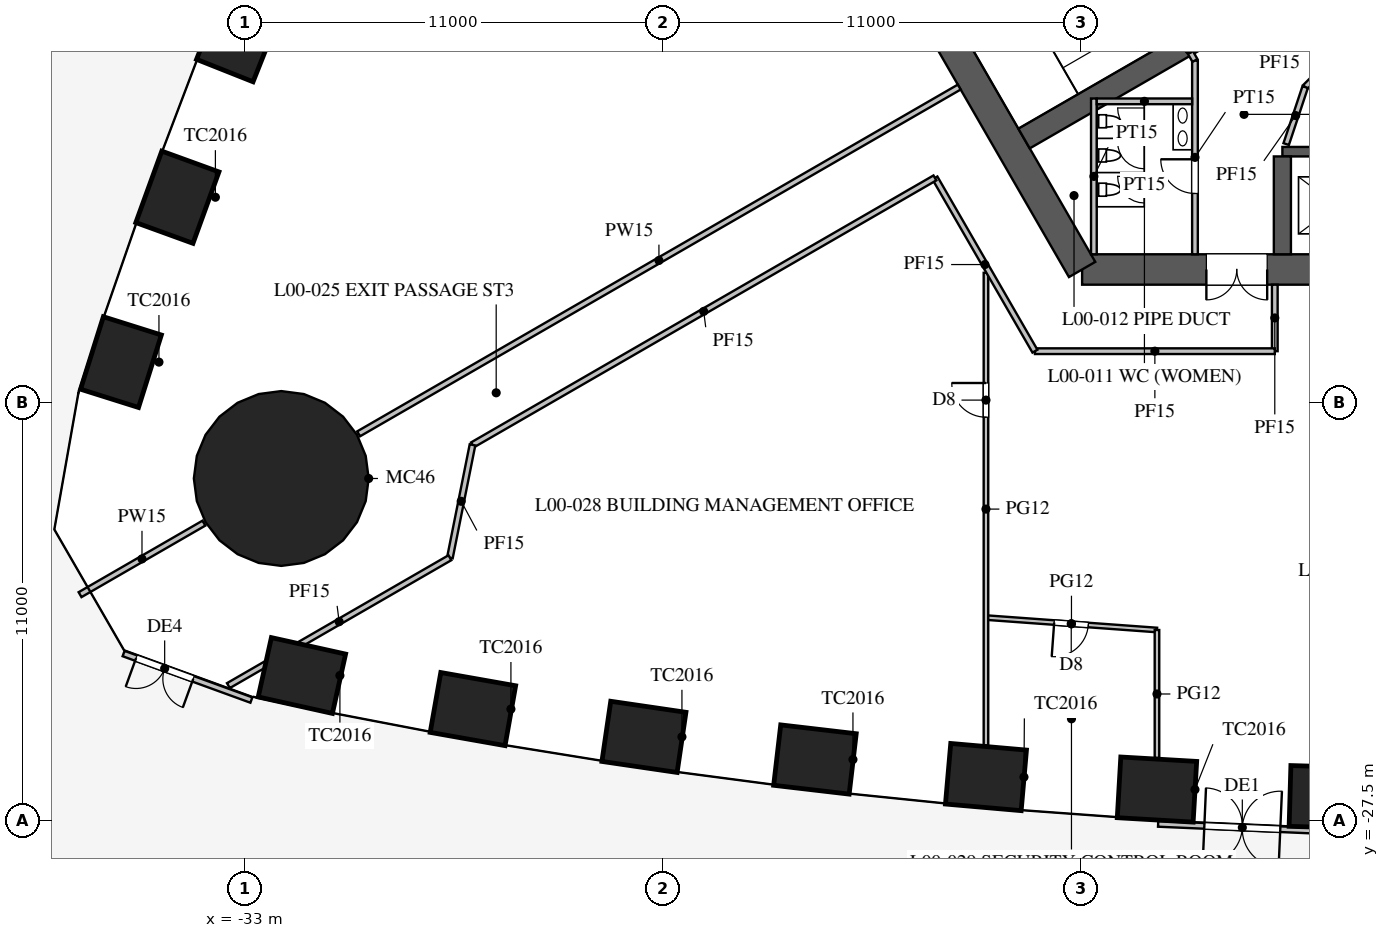
"""IFC4 building model, lengths in metres.
Left out: names, types, materials, properties, quantities, classifications, styles, units other than length and angle.
Written with IfcOpenShell. Run it as: python <this file> out.ifc"""

import sys

from ifc_helpers import new_model, si_unit, direction, frame, frame_2d, origin, origin_2d, place, context, subcontext, project, spatial, rectangle, circle, extrude, element, fill, save


model = new_model("IFC4")
c1 = context("Model", 3, precision=1e-05, world=origin(), true_north=direction((0.0, 1.0)))
c2 = subcontext(c1, "Body", "Model", "MODEL_VIEW")
j1 = project(units=[si_unit("LENGTHUNIT", "METRE"), si_unit("PLANEANGLEUNIT", "RADIAN")], contexts=[c1])
p1 = place(None, origin())
s1 = spatial("IfcSite", under=j1, at=p1, CompositionType="ELEMENT")
p2 = place(p1, origin())
s2 = spatial("IfcBuilding", under=s1, at=p2, CompositionType="ELEMENT")
p3 = place(p2, origin())
s3 = spatial("IfcBuildingStorey", under=s2, at=p3, CompositionType="ELEMENT", Elevation=0.0)
for number, where, z_axis, x_axis in (
    (1, (-31.5, -23.685, 0.0), (0.0, 0.0, 1.0), (0.976, -0.217, 0.0)),
    (2, (-27.0, -24.568, 0.0), (0.0, 0.0, 1.0), (0.985, -0.174, 0.0)),
    (3, (-22.5, -25.299, 0.0), (0.0, 0.0, 1.0), (0.989, -0.145, 0.0)),
    (4, (-18.0, -25.895, 0.0), (0.0, 0.0, 1.0), (0.993, -0.116, 0.0)),
    (5, (-13.5, -26.357, 0.0), (0.0, 0.0, 1.0), (0.996, -0.087, 0.0)),
    (6, (-9.0, -26.686, 0.0), (0.0, 0.0, 1.0), (0.998, -0.058, 0.0)),
    (7, (-4.5, -26.883, 0.0), (0.0, 0.0, 1.0), (1.0, -0.029, 0.0)),
    (8, (-33.16, -6.836, 0.0), (0.0, 0.0, 1.0), (-0.369, -0.929, 0.0)),
    (9, (-34.776, -11.099, 0.0), (0.0, 0.0, 1.0), (-0.342, -0.94, 0.0)),
    (10, (-36.262, -15.438, 0.0), (0.0, 0.0, 1.0), (-0.3, -0.954, 0.0)),
):
    element("IfcColumn", number, at=place(p3, frame(where, z_axis=z_axis, x_axis=x_axis)), inside=s3, PredefinedType="COLUMN", context=c2, shape_type="SweptSolid", body=[
        extrude(rectangle(XDim=2.0, YDim=1.6, at=origin_2d()), origin(), (0.0, 0.0, 1.0), 6.5),
    ])
p4 = place(p3, frame((-32.043, -18.5, 0.0), z_axis=(0.0, 0.0, 1.0), x_axis=(1.0, 0.0, 0.0)))
e11 = element("IfcColumn", 11, at=p4, inside=s3, PredefinedType="COLUMN", context=c2, shape_type="SweptSolid", body=[
    extrude(circle(Radius=2.3, at=origin_2d()), origin(), (0.0, 0.0, 1.0), 6.5),
])
p5 = place(p3, frame((-10.97, -13.0, 0.0), z_axis=(0.0, 0.0, 1.0), x_axis=(1.0, 0.0, 0.0)))
e12 = element("IfcWall", 12, at=p5, inside=s3, PredefinedType="SHEAR", context=c2, shape_type="SweptSolid", body=[
    extrude(rectangle(XDim=21.939, YDim=0.8, at=frame_2d((10.97, 0.0))), origin(), (0.0, 0.0, 1.0), 6.5),
])
p6 = place(p5, frame((16.97, 0.0, 0.0)))
e13 = element("IfcOpeningElement", 13, at=p6, cuts=e12, PredefinedType="OPENING", context=c2, shape_type="SweptSolid", body=[
    extrude(rectangle(XDim=1.8, YDim=2.1, at=frame_2d((0.9, 1.05))), frame((0.0, 0.41, 0.0), z_axis=(0.0, -1.0, 0.0), x_axis=(1.0, 0.0, 0.0)), (0.0, 0.0, 1.0), 0.82),
])
p7 = place(p5, frame((3.27, 0.0, 0.0)))
e14 = element("IfcOpeningElement", 14, at=p7, cuts=e12, PredefinedType="OPENING", context=c2, shape_type="SweptSolid", body=[
    extrude(rectangle(XDim=1.6, YDim=2.1, at=frame_2d((0.8, 1.05))), frame((0.0, 0.41, 0.0), z_axis=(0.0, -1.0, 0.0), x_axis=(1.0, 0.0, 0.0)), (0.0, 0.0, 1.0), 0.82),
])
p8 = place(p3, frame((-16.743, -3.0, 0.0), z_axis=(0.0, 0.0, 1.0), x_axis=(0.499995765644, -0.866027848477, 0.0)))
e15 = element("IfcWall", 15, at=p8, inside=s3, PredefinedType="SHEAR", context=c2, shape_type="SweptSolid", body=[
    extrude(rectangle(XDim=11.547, YDim=0.8, at=frame_2d((5.773, 0.0))), origin(), (0.0, 0.0, 1.0), 6.5),
])
p9 = place(p3, frame((-5.7, -9.9, 0.0), z_axis=(0.0, 0.0, 1.0), x_axis=(1.0, 0.0, 0.0)))
e16 = element("IfcWall", 16, at=p9, inside=s3, PredefinedType="SHEAR", context=c2, shape_type="SweptSolid", body=[
    extrude(rectangle(XDim=11.4, YDim=0.25, at=frame_2d((5.7, 0.0))), origin(), (0.0, 0.0, 1.0), 6.5),
])
p10 = place(p9, frame((0.875, 0.0, 0.0)))
e17 = element("IfcOpeningElement", 17, at=p10, cuts=e16, PredefinedType="OPENING", context=c2, shape_type="SweptSolid", body=[
    extrude(rectangle(XDim=1.1, YDim=2.2, at=frame_2d((0.55, 1.1))), frame((0.0, 0.135, 0.0), z_axis=(0.0, -1.0, 0.0), x_axis=(1.0, 0.0, 0.0)), (0.0, 0.0, 1.0), 0.27),
])
p11 = place(p9, frame((3.725, 0.0, 0.0)))
e18 = element("IfcOpeningElement", 18, at=p11, cuts=e16, PredefinedType="OPENING", context=c2, shape_type="SweptSolid", body=[
    extrude(rectangle(XDim=1.1, YDim=2.2, at=frame_2d((0.55, 1.1))), frame((0.0, 0.135, 0.0), z_axis=(0.0, -1.0, 0.0), x_axis=(1.0, 0.0, 0.0)), (0.0, 0.0, 1.0), 0.27),
])
p12 = place(p9, frame((6.575, 0.0, 0.0)))
e19 = element("IfcOpeningElement", 19, at=p12, cuts=e16, PredefinedType="OPENING", context=c2, shape_type="SweptSolid", body=[
    extrude(rectangle(XDim=1.1, YDim=2.2, at=frame_2d((0.55, 1.1))), frame((0.0, 0.135, 0.0), z_axis=(0.0, -1.0, 0.0), x_axis=(1.0, 0.0, 0.0)), (0.0, 0.0, 1.0), 0.27),
])
p13 = place(p9, frame((9.425, 0.0, 0.0)))
e20 = element("IfcOpeningElement", 20, at=p13, cuts=e16, PredefinedType="OPENING", context=c2, shape_type="SweptSolid", body=[
    extrude(rectangle(XDim=1.1, YDim=2.2, at=frame_2d((0.55, 1.1))), frame((0.0, 0.135, 0.0), z_axis=(0.0, -1.0, 0.0), x_axis=(1.0, 0.0, 0.0)), (0.0, 0.0, 1.0), 0.27),
])
p14 = place(p3, frame((-5.7, -10.025, 0.0), z_axis=(0.0, 0.0, 1.0), x_axis=(0.0, -1.0, 0.0)))
e21 = element("IfcWall", 21, at=p14, inside=s3, PredefinedType="SHEAR", context=c2, shape_type="SweptSolid", body=[
    extrude(rectangle(XDim=2.575, YDim=0.45, at=frame_2d((1.288, 0.0))), origin(), (0.0, 0.0, 1.0), 6.5),
])
p15 = place(p3, frame((-4.638, -5.016, 0.0), z_axis=(0.0, 0.0, 1.0), x_axis=(-0.866019375473, -0.500010441196, 0.0)))
e22 = element("IfcWall", 22, at=p15, inside=s3, PredefinedType="SHEAR", context=c2, shape_type="SweptSolid", body=[
    extrude(rectangle(XDim=9.075, YDim=0.6, at=frame_2d((4.538, 0.0))), origin(), (0.0, 0.0, 1.0), 6.5),
])
p16 = place(p15, frame((0.265, 0.0, 0.0)))
e23 = element("IfcOpeningElement", 23, at=p16, cuts=e22, PredefinedType="OPENING", context=c2, shape_type="SweptSolid", body=[
    extrude(rectangle(XDim=1.6, YDim=2.1, at=frame_2d((0.8, 1.05))), frame((0.0, 0.31, 0.0), z_axis=(0.0, -1.0, 0.0), x_axis=(1.0, 0.0, 0.0)), (0.0, 0.0, 1.0), 0.62),
])
p17 = place(p3, frame((-8.969, -27.589, 0.0), z_axis=(0.0, 0.0, 1.0), x_axis=(0.999053663589, -0.043494565978, 0.0)))
e24 = element("IfcWall", 24, at=p17, inside=s3, PredefinedType="SOLIDWALL", context=c2, shape_type="SweptSolid", body=[
    extrude(rectangle(XDim=4.434, YDim=0.15, at=frame_2d((2.217, 0.0))), origin(), (0.0, 0.0, 1.0), 6.48),
])
p18 = place(p17, frame((1.217, 0.0, 0.0)))
e25 = element("IfcOpeningElement", 25, at=p18, cuts=e24, PredefinedType="OPENING", context=c2, shape_type="SweptSolid", body=[
    extrude(rectangle(XDim=2.0, YDim=3.0, at=frame_2d((1.0, 1.5))), frame((0.0, 0.085, 0.0), z_axis=(0.0, -1.0, 0.0), x_axis=(1.0, 0.0, 0.0)), (0.0, 0.0, 1.0), 0.17),
])
p19 = place(p3, frame((-36.192, -23.107, 0.0), z_axis=(0.0, 0.0, 1.0), x_axis=(0.939683806401, -0.342044359678, 0.0)))
e26 = element("IfcWall", 26, at=p19, inside=s3, PredefinedType="SOLIDWALL", context=c2, shape_type="SweptSolid", body=[
    extrude(rectangle(XDim=3.578, YDim=0.15, at=frame_2d((1.789, 0.0))), origin(), (0.0, 0.0, 1.0), 6.48),
])
p20 = place(p19, frame((0.35, 0.0, 0.0)))
e27 = element("IfcOpeningElement", 27, at=p20, cuts=e26, PredefinedType="OPENING", context=c2, shape_type="SweptSolid", body=[
    extrude(rectangle(XDim=1.6, YDim=2.4, at=frame_2d((0.8, 1.2))), frame((0.0, 0.085, 0.0), z_axis=(0.0, -1.0, 0.0), x_axis=(1.0, 0.0, 0.0)), (0.0, 0.0, 1.0), 0.17),
])
p21 = place(p3, frame((-8.0, -7.5, 0.0), z_axis=(0.0, 0.0, 1.0), x_axis=(0.0, -1.0, 0.0)))
e28 = element("IfcWall", 28, at=p21, inside=s3, PredefinedType="PARTITIONING", context=c2, shape_type="SweptSolid", body=[
    extrude(rectangle(XDim=5.1, YDim=0.15, at=frame_2d((2.55, 0.0))), origin(), (0.0, 0.0, 1.0), 6.3),
])
p22 = place(p21, frame((2.6, 0.0, 0.0)))
e29 = element("IfcOpeningElement", 29, at=p22, cuts=e28, PredefinedType="OPENING", context=c2, shape_type="SweptSolid", body=[
    extrude(rectangle(XDim=0.9, YDim=2.1, at=frame_2d((0.45, 1.05))), frame((0.0, 0.085, 0.0), z_axis=(0.0, -1.0, 0.0), x_axis=(1.0, 0.0, 0.0)), (0.0, 0.0, 1.0), 0.17),
])
p23 = place(p3, frame((-8.0, -7.5, 0.0), z_axis=(0.0, 0.0, 1.0), x_axis=(-0.499842556608, 0.866116284689, 0.0)))
e30 = element("IfcWall", 30, at=p23, inside=s3, PredefinedType="PARTITIONING", context=c2, shape_type="SweptSolid", body=[
    extrude(rectangle(XDim=0.645, YDim=0.15, at=frame_2d((0.323, 0.0))), origin(), (0.0, 0.0, 1.0), 6.3),
])
p24 = place(p3, frame((-10.66, -8.5, 0.0), z_axis=(0.0, 0.0, 1.0), x_axis=(0.0, -1.0, 0.0)))
e31 = element("IfcWall", 31, at=p24, inside=s3, PredefinedType="PARTITIONING", context=c2, shape_type="SweptSolid", body=[
    extrude(rectangle(XDim=4.1, YDim=0.15, at=frame_2d((2.05, 0.0))), origin(), (0.0, 0.0, 1.0), 6.3),
])
p25 = place(p3, frame((-8.075, -8.575, 0.0), z_axis=(0.0, 0.0, 1.0), x_axis=(-1.0, 0.0, 0.0)))
e32 = element("IfcWall", 32, at=p25, inside=s3, PredefinedType="PARTITIONING", context=c2, shape_type="SweptSolid", body=[
    extrude(rectangle(XDim=2.51, YDim=0.15, at=frame_2d((1.255, 0.0))), origin(), (0.0, 0.0, 1.0), 6.3),
])
p26 = place(p3, frame((-14.203, -8.2, 0.0), z_axis=(0.0, 0.0, 1.0), x_axis=(-0.866024965723, -0.500000758745, 0.0)))
e33 = element("IfcWall", 33, at=p26, inside=s3, PredefinedType="PARTITIONING", context=c2, shape_type="SweptSolid", body=[
    extrude(rectangle(XDim=18.25, YDim=0.15, at=frame_2d((9.125, 0.0))), origin(), (0.0, 0.0, 1.0), 4.6),
])
p27 = place(p3, frame((-34.078, -19.675, 0.0), z_axis=(0.0, 0.0, 1.0), x_axis=(-0.866019247219, -0.500010663332, 0.0)))
e34 = element("IfcWall", 34, at=p27, inside=s3, PredefinedType="PARTITIONING", context=c2, shape_type="SweptSolid", body=[
    extrude(rectangle(XDim=3.764, YDim=0.15, at=frame_2d((1.882, 0.0))), origin(), (0.0, 0.0, 1.0), 4.6),
])
p28 = place(p3, frame((-13.5, -22.16, 0.0), z_axis=(0.0, 0.0, 1.0), x_axis=(0.997363894896, -0.072562119306, 0.0)))
e35 = element("IfcWall", 35, at=p28, inside=s3, PredefinedType="PARTITIONING", context=c2, shape_type="SweptSolid", body=[
    extrude(rectangle(XDim=4.512, YDim=0.12, at=frame_2d((2.256, 0.0))), origin(), (0.0, 0.0, 1.0), 5.0),
])
p29 = place(p28, frame((1.8, 0.0, 0.0)))
e36 = element("IfcOpeningElement", 36, at=p29, cuts=e35, PredefinedType="OPENING", context=c2, shape_type="SweptSolid", body=[
    extrude(rectangle(XDim=0.9, YDim=2.1, at=frame_2d((0.45, 1.05))), frame((0.0, 0.07, 0.0), z_axis=(0.0, -1.0, 0.0), x_axis=(1.0, 0.0, 0.0)), (0.0, 0.0, 1.0), 0.14),
])
p30 = place(p3, frame((-13.5, -13.087, 0.0), z_axis=(0.0, 0.0, 1.0), x_axis=(0.0, -1.0, 0.0)))
e37 = element("IfcWall", 37, at=p30, inside=s3, PredefinedType="PARTITIONING", context=c2, shape_type="SweptSolid", body=[
    extrude(rectangle(XDim=12.437, YDim=0.12, at=frame_2d((6.218, 0.0))), origin(), (0.0, 0.0, 1.0), 5.0),
])
p31 = place(p30, frame((2.9, 0.0, 0.0)))
e38 = element("IfcOpeningElement", 38, at=p31, cuts=e37, PredefinedType="OPENING", context=c2, shape_type="SweptSolid", body=[
    extrude(rectangle(XDim=0.9, YDim=2.1, at=frame_2d((0.45, 1.05))), frame((0.0, 0.07, 0.0), z_axis=(0.0, -1.0, 0.0), x_axis=(1.0, 0.0, 0.0)), (0.0, 0.0, 1.0), 0.14),
])
p32 = place(p3, frame((-9.0, -22.487, 0.0), z_axis=(0.0, 0.0, 1.0), x_axis=(0.0, -1.0, 0.0)))
e39 = element("IfcWall", 39, at=p32, inside=s3, PredefinedType="PARTITIONING", context=c2, shape_type="SweptSolid", body=[
    extrude(rectangle(XDim=3.367, YDim=0.12, at=frame_2d((1.684, 0.0))), origin(), (0.0, 0.0, 1.0), 5.0),
])
p33 = place(p3, frame((-3.586, -6.689, 0.0), z_axis=(0.0, 0.0, 1.0), x_axis=(-0.707905319983, -0.706307339577, 0.0)))
e40 = element("IfcWall", 40, at=p33, inside=s3, PredefinedType="PARTITIONING", context=c2, shape_type="SweptSolid", body=[
    extrude(rectangle(XDim=2.139, YDim=0.15, at=frame_2d((1.069, 0.0))), origin(), (0.0, 0.0, 1.0), 6.3),
])
p34 = place(p3, frame((-5.1, -8.2, 0.0), z_axis=(0.0, 0.0, 1.0), x_axis=(-0.316227766017, -0.948683298051, 0.0)))
e41 = element("IfcWall", 41, at=p34, inside=s3, PredefinedType="PARTITIONING", context=c2, shape_type="SweptSolid", body=[
    extrude(rectangle(XDim=1.581, YDim=0.15, at=frame_2d((0.791, 0.0))), origin(), (0.0, 0.0, 1.0), 6.3),
])
p35 = place(p3, frame((-5.9, -13.4, 0.0), z_axis=(0.0, 0.0, 1.0), x_axis=(0.0, -1.0, 0.0)))
e42 = element("IfcWall", 42, at=p35, inside=s3, PredefinedType="PARTITIONING", context=c2, shape_type="SweptSolid", body=[
    extrude(rectangle(XDim=1.75, YDim=0.15, at=frame_2d((0.875, 0.0))), origin(), (0.0, 0.0, 1.0), 6.3),
])
p36 = place(p3, frame((-5.9, -15.15, 0.0), z_axis=(0.0, 0.0, 1.0), x_axis=(-1.0, 0.0, 0.0)))
e43 = element("IfcWall", 43, at=p36, inside=s3, PredefinedType="PARTITIONING", context=c2, shape_type="SweptSolid", body=[
    extrude(rectangle(XDim=6.311, YDim=0.15, at=frame_2d((3.156, 0.0))), origin(), (0.0, 0.0, 1.0), 6.3),
])
p37 = place(p3, frame((-12.211, -15.15, 0.0), z_axis=(0.0, 0.0, 1.0), x_axis=(-0.499999433879, 0.866025730634, 0.0)))
e44 = element("IfcWall", 44, at=p37, inside=s3, PredefinedType="PARTITIONING", context=c2, shape_type="SweptSolid", body=[
    extrude(rectangle(XDim=5.265, YDim=0.15, at=frame_2d((2.632, 0.0))), origin(), (0.0, 0.0, 1.0), 6.3),
])
p38 = place(p3, frame((-14.843, -10.591, 0.0), z_axis=(0.0, 0.0, 1.0), x_axis=(-0.86602961784, -0.499992700971, 0.0)))
e45 = element("IfcWall", 45, at=p38, inside=s3, PredefinedType="PARTITIONING", context=c2, shape_type="SweptSolid", body=[
    extrude(rectangle(XDim=14.05, YDim=0.15, at=frame_2d((7.025, 0.0))), origin(), (0.0, 0.0, 1.0), 6.3),
])
p39 = place(p3, frame((-27.011, -17.615, 0.0), z_axis=(0.0, 0.0, 1.0), x_axis=(-0.196255629336, -0.980552766532, 0.0)))
e46 = element("IfcWall", 46, at=p39, inside=s3, PredefinedType="PARTITIONING", context=c2, shape_type="SweptSolid", body=[
    extrude(rectangle(XDim=3.029, YDim=0.15, at=frame_2d((1.515, 0.0))), origin(), (0.0, 0.0, 1.0), 5.7),
])
p40 = place(p3, frame((-27.605, -20.586, 0.0), z_axis=(0.0, 0.0, 1.0), x_axis=(-0.866029136921, -0.499993533961, 0.0)))
e47 = element("IfcWall", 47, at=p40, inside=s3, PredefinedType="PARTITIONING", context=c2, shape_type="SweptSolid", body=[
    extrude(rectangle(XDim=6.73, YDim=0.15, at=frame_2d((3.365, 0.0))), origin(), (0.0, 0.0, 1.0), 6.3),
])
p41 = place(p18, origin())
e48 = element("IfcDoor", 48, at=p41, inside=s3, OperationType="DOUBLE_DOOR_DOUBLE_SWING", PredefinedType="DOOR", context=c2, shape_type="SweptSolid", body=[
    extrude(rectangle(XDim=2.0, YDim=3.0, at=frame_2d((1.0, 1.5))), frame((0.0, 0.025, 0.0), z_axis=(0.0, -1.0, 0.0), x_axis=(1.0, 0.0, 0.0)), (0.0, 0.0, 1.0), 0.05),
])
fill(e25, e48)
p42 = place(p20, frame((1.6, 0.0, 0.0), z_axis=(0.0, 0.0, 1.0), x_axis=(-1.0, 0.0, 0.0)))
e49 = element("IfcDoor", 49, at=p42, inside=s3, OperationType="DOUBLE_DOOR_SINGLE_SWING", PredefinedType="DOOR", context=c2, shape_type="SweptSolid", body=[
    extrude(rectangle(XDim=1.6, YDim=2.4, at=frame_2d((0.8, 1.2))), frame((0.0, 0.025, 0.0), z_axis=(0.0, -1.0, 0.0), x_axis=(1.0, 0.0, 0.0)), (0.0, 0.0, 1.0), 0.05),
])
fill(e27, e49)
p43 = place(p22, frame((0.9, 0.0, 0.0), z_axis=(0.0, 0.0, 1.0), x_axis=(-1.0, 0.0, 0.0)))
e50 = element("IfcDoor", 50, at=p43, inside=s3, OperationType="SINGLE_SWING_RIGHT", PredefinedType="DOOR", context=c2, shape_type="SweptSolid", body=[
    extrude(rectangle(XDim=0.9, YDim=2.1, at=frame_2d((0.45, 1.05))), frame((0.0, 0.025, 0.0), z_axis=(0.0, -1.0, 0.0), x_axis=(1.0, 0.0, 0.0)), (0.0, 0.0, 1.0), 0.05),
])
fill(e29, e50)
p44 = place(p7, frame((1.6, 0.0, 0.0), z_axis=(0.0, 0.0, 1.0), x_axis=(-1.0, 0.0, 0.0)))
e51 = element("IfcDoor", 51, at=p44, inside=s3, OperationType="DOUBLE_DOOR_SINGLE_SWING", PredefinedType="DOOR", context=c2, shape_type="SweptSolid", body=[
    extrude(rectangle(XDim=1.6, YDim=2.1, at=frame_2d((0.8, 1.05))), frame((0.0, 0.025, 0.0), z_axis=(0.0, -1.0, 0.0), x_axis=(1.0, 0.0, 0.0)), (0.0, 0.0, 1.0), 0.05),
])
fill(e14, e51)
p45 = place(p31, frame((0.9, 0.0, 0.0), z_axis=(0.0, 0.0, 1.0), x_axis=(-1.0, 0.0, 0.0)))
e52 = element("IfcDoor", 52, at=p45, inside=s3, OperationType="SINGLE_SWING_RIGHT", PredefinedType="DOOR", context=c2, shape_type="SweptSolid", body=[
    extrude(rectangle(XDim=0.9, YDim=2.1, at=frame_2d((0.45, 1.05))), frame((0.0, 0.025, 0.0), z_axis=(0.0, -1.0, 0.0), x_axis=(1.0, 0.0, 0.0)), (0.0, 0.0, 1.0), 0.05),
])
fill(e38, e52)
p46 = place(p29, frame((0.9, 0.0, 0.0), z_axis=(0.0, 0.0, 1.0), x_axis=(-1.0, 0.0, 0.0)))
e53 = element("IfcDoor", 53, at=p46, inside=s3, OperationType="SINGLE_SWING_RIGHT", PredefinedType="DOOR", context=c2, shape_type="SweptSolid", body=[
    extrude(rectangle(XDim=0.9, YDim=2.1, at=frame_2d((0.45, 1.05))), frame((0.0, 0.025, 0.0), z_axis=(0.0, -1.0, 0.0), x_axis=(1.0, 0.0, 0.0)), (0.0, 0.0, 1.0), 0.05),
])
fill(e36, e53)
save(model, sys.argv[1])
